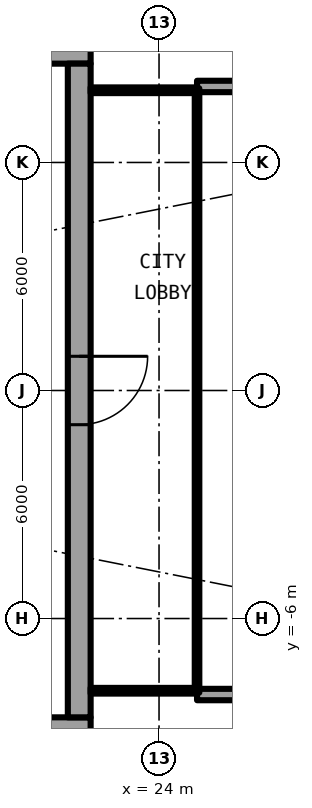
"""IFC4 building model, lengths in metres.
Left out: names, types, materials, properties, quantities, classifications, styles, units other than length and angle.
Written with IfcOpenShell. Run it as: python <this file> out.ifc"""

import sys

from ifc_helpers import new_model, si_unit, direction, frame, frame_2d, origin, place, context, subcontext, project, spatial, rectangle, extrude, element, fill, save


model = new_model("IFC4")
c1 = context("Model", 3, precision=1e-05, world=origin(), true_north=direction((0.0, 1.0)))
c2 = subcontext(c1, "Body", "Model", "MODEL_VIEW")
j1 = project(units=[si_unit("LENGTHUNIT", "METRE"), si_unit("PLANEANGLEUNIT", "RADIAN")], contexts=[c1])
p1 = place(None, origin())
s1 = spatial("IfcSite", under=j1, at=p1, CompositionType="ELEMENT")
p2 = place(p1, origin())
s2 = spatial("IfcBuilding", under=s1, at=p2, CompositionType="ELEMENT")
p3 = place(p2, frame((0.0, 0.0, 120.8)))
s3 = spatial("IfcBuildingStorey", under=s2, at=p3, CompositionType="ELEMENT", Elevation=120.8)
for number, where, z_axis, x_axis in (
    (1, (25.0, 8.0, 0.0), (0.0, 0.0, 1.0), (1.0, 0.0, 0.0)),
    (2, (25.0, -8.0, 0.0), (0.0, 0.0, 1.0), (1.0, 0.0, 0.0)),
):
    element("IfcWall", number, at=place(p3, frame(where, z_axis=z_axis, x_axis=x_axis)), inside=s3, PredefinedType="SOLIDWALL", context=c2, shape_type="SweptSolid", body=[
        extrude(rectangle(XDim=2.667, YDim=0.3, at=frame_2d((1.333, 0.0))), origin(), (0.0, 0.0, 1.0), 2.7),
    ])
p4 = place(p3, frame((22.2, 8.9, 0.0), z_axis=(0.0, 0.0, 1.0), x_axis=(-1.0, 0.0, 0.0)))
e3 = element("IfcWall", 3, at=p4, inside=s3, PredefinedType="SHEAR", context=c2, shape_type="SweptSolid", body=[
    extrude(rectangle(XDim=13.8, YDim=0.6, at=frame_2d((6.9, 0.0))), origin(), (0.0, 0.0, 1.0), 3.05),
])
p5 = place(p4, frame((1.125, 0.0, 0.0)))
e4 = element("IfcOpeningElement", 4, at=p5, cuts=e3, PredefinedType="OPENING", context=c2, shape_type="SweptSolid", body=[
    extrude(rectangle(XDim=1.2, YDim=2.3, at=frame_2d((0.6, 1.15))), frame((0.0, 0.31, 0.0), z_axis=(0.0, -1.0, 0.0), x_axis=(1.0, 0.0, 0.0)), (0.0, 0.0, 1.0), 0.62),
])
p6 = place(p3, frame((8.4, -8.9, 0.0), z_axis=(0.0, 0.0, 1.0), x_axis=(1.0, 0.0, 0.0)))
e5 = element("IfcWall", 5, at=p6, inside=s3, PredefinedType="SHEAR", context=c2, shape_type="SweptSolid", body=[
    extrude(rectangle(XDim=13.8, YDim=0.6, at=frame_2d((6.9, 0.0))), origin(), (0.0, 0.0, 1.0), 3.05),
])
p7 = place(p6, frame((11.475, 0.0, 0.0)))
e6 = element("IfcOpeningElement", 6, at=p7, cuts=e5, PredefinedType="OPENING", context=c2, shape_type="SweptSolid", body=[
    extrude(rectangle(XDim=1.2, YDim=2.3, at=frame_2d((0.6, 1.15))), frame((0.0, 0.31, 0.0), z_axis=(0.0, -1.0, 0.0), x_axis=(1.0, 0.0, 0.0)), (0.0, 0.0, 1.0), 0.62),
])
p8 = place(p3, frame((21.9, 8.6, 0.0), z_axis=(0.0, 0.0, 1.0), x_axis=(0.0, -1.0, 0.0)))
e7 = element("IfcWall", 7, at=p8, inside=s3, PredefinedType="SHEAR", context=c2, shape_type="SweptSolid", body=[
    extrude(rectangle(XDim=17.2, YDim=0.6, at=frame_2d((8.6, 0.0))), origin(), (0.0, 0.0, 1.0), 3.05),
])
p9 = place(p8, frame((7.7, 0.0, 0.0)))
e8 = element("IfcOpeningElement", 8, at=p9, cuts=e7, PredefinedType="OPENING", context=c2, shape_type="SweptSolid", body=[
    extrude(rectangle(XDim=1.8, YDim=2.3, at=frame_2d((0.9, 1.15))), frame((0.0, 0.31, 0.0), z_axis=(0.0, -1.0, 0.0), x_axis=(1.0, 0.0, 0.0)), (0.0, 0.0, 1.0), 0.62),
])
for number, where, z_axis, x_axis in (
    (9, (22.2, -7.9, 0.0), (0.0, 0.0, 1.0), (1.0, 0.0, 0.0)),
    (10, (22.2, 7.9, 0.0), (0.0, 0.0, 1.0), (1.0, 0.0, 0.0)),
):
    element("IfcWall", number, at=place(p3, frame(where, z_axis=z_axis, x_axis=x_axis)), inside=s3, PredefinedType="PARTITIONING", context=c2, shape_type="SweptSolid", body=[
        extrude(rectangle(XDim=2.74, YDim=0.15, at=frame_2d((1.37, 0.0))), origin(), (0.0, 0.0, 1.0), 2.7),
    ])
p10 = place(p3, frame((25.0, -7.95, 0.0), z_axis=(0.0, 0.0, 1.0), x_axis=(0.0, 1.0, 0.0)))
e11 = element("IfcWall", 11, at=p10, inside=s3, PredefinedType="PARTITIONING", context=c2, shape_type="SweptSolid", body=[
    extrude(rectangle(XDim=15.9, YDim=0.12, at=frame_2d((7.95, 0.0))), origin(), (0.0, 0.0, 1.0), 2.7),
])
p11 = place(p10, frame((0.95, 0.0, 0.1)))
e12 = element("IfcOpeningElement", 12, at=p11, cuts=e11, PredefinedType="OPENING", context=c2, shape_type="SweptSolid", body=[
    extrude(rectangle(XDim=14.0, YDim=2.35, at=frame_2d((7.0, 1.175))), frame((0.0, 0.07, 0.0), z_axis=(0.0, -1.0, 0.0), x_axis=(1.0, 0.0, 0.0)), (0.0, 0.0, 1.0), 0.14),
])
p12 = place(p9, origin())
e13 = element("IfcDoor", 13, at=p12, inside=s3, OperationType="SINGLE_SWING_LEFT", PredefinedType="DOOR", context=c2, shape_type="SweptSolid", body=[
    extrude(rectangle(XDim=1.8, YDim=2.3, at=frame_2d((0.9, 1.15))), frame((0.0, 0.025, 0.0), z_axis=(0.0, -1.0, 0.0), x_axis=(1.0, 0.0, 0.0)), (0.0, 0.0, 1.0), 0.05),
])
fill(e8, e13)
p13 = place(p11, origin())
e14 = element("IfcWindow", 14, at=p13, inside=s3, PartitioningType="SINGLE_PANEL", PredefinedType="WINDOW", context=c2, shape_type="SweptSolid", body=[
    extrude(rectangle(XDim=14.0, YDim=2.35, at=frame_2d((7.0, 1.175))), frame((0.0, 0.03, 0.0), z_axis=(0.0, -1.0, 0.0), x_axis=(1.0, 0.0, 0.0)), (0.0, 0.0, 1.0), 0.06),
])
fill(e12, e14)
save(model, sys.argv[1])
